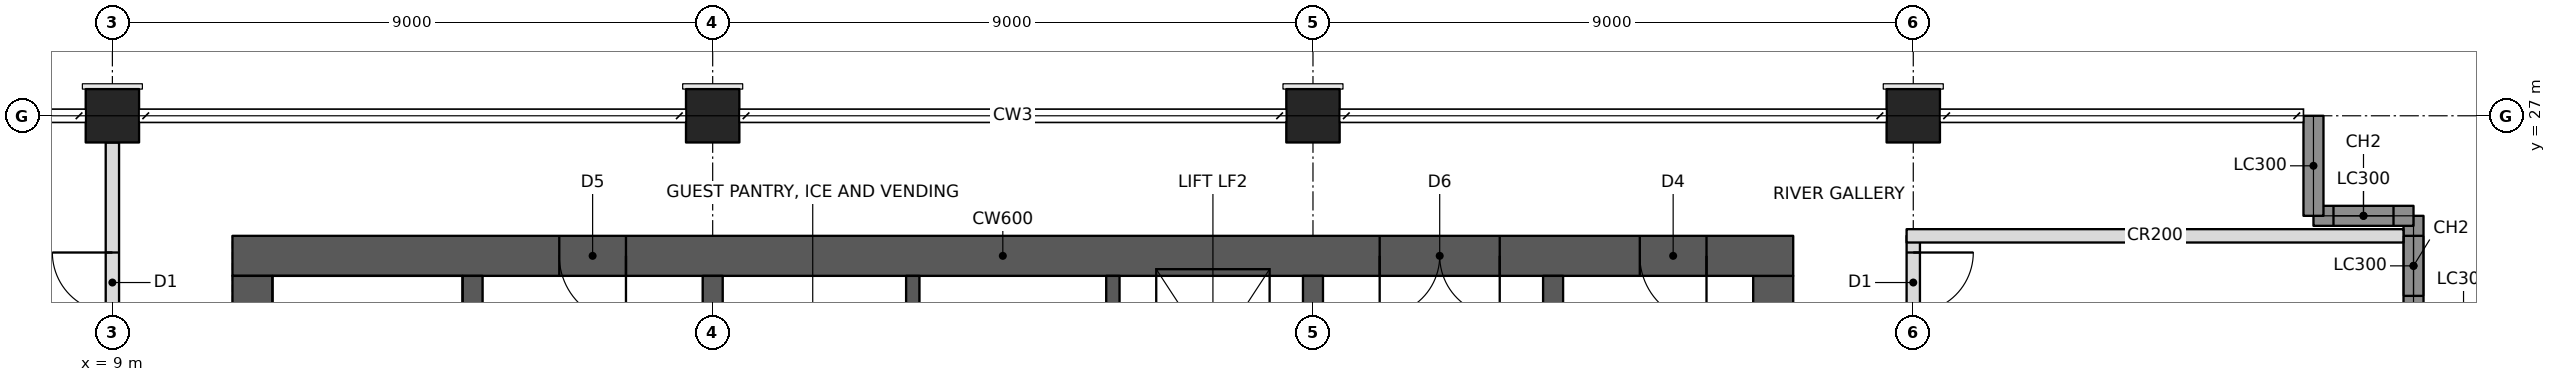
"""IFC4 building model, lengths in metres.
Left out: names, types, materials, properties, quantities, classifications, styles, units other than length and angle.
Written with IfcOpenShell. Run it as: python <this file> out.ifc"""

import sys

from ifc_helpers import new_model, si_unit, direction, frame, frame_2d, origin, origin_2d, place, context, subcontext, project, spatial, rectangle, hollow_rectangle, extrude, element, fill, save


model = new_model("IFC4")
c1 = context("Model", 3, precision=1e-05, world=origin(), true_north=direction((0.0, 1.0)))
c2 = subcontext(c1, "Body", "Model", "MODEL_VIEW")
j1 = project(units=[si_unit("LENGTHUNIT", "METRE"), si_unit("PLANEANGLEUNIT", "RADIAN")], contexts=[c1])
p1 = place(None, origin())
s1 = spatial("IfcSite", under=j1, at=p1, CompositionType="ELEMENT")
p2 = place(p1, origin())
s2 = spatial("IfcBuilding", under=s1, at=p2, CompositionType="ELEMENT")
p3 = place(p2, frame((0.0, 0.0, 187.6)))
s3 = spatial("IfcBuildingStorey", under=s2, at=p3, CompositionType="ELEMENT", Elevation=187.6)
for number, where, z_axis, x_axis in (
    (1, (9.0, 27.0, 0.0), (0.0, 0.0, 1.0), (1.0, 0.0, 0.0)),
    (2, (18.0, 27.0, 0.0), (0.0, 0.0, 1.0), (1.0, 0.0, 0.0)),
    (3, (27.0, 27.0, 0.0), (0.0, 0.0, 1.0), (1.0, 0.0, 0.0)),
    (4, (36.0, 27.0, 0.0), (0.0, 0.0, 1.0), (1.0, 0.0, 0.0)),
):
    element("IfcColumn", number, at=place(p3, frame(where, z_axis=z_axis, x_axis=x_axis)), inside=s3, PredefinedType="COLUMN", context=c2, shape_type="SweptSolid", body=[
        extrude(hollow_rectangle(XDim=0.8, YDim=0.8, WallThickness=0.07, at=origin_2d()), origin(), (0.0, 0.0, 1.0), 3.4),
    ])
p4 = place(p3, frame((10.8, 24.9, 0.0), z_axis=(0.0, 0.0, 1.0), x_axis=(1.0, 0.0, 0.0)))
e5 = element("IfcWall", 5, at=p4, inside=s3, PredefinedType="SHEAR", context=c2, shape_type="SweptSolid", body=[
    extrude(rectangle(XDim=23.4, YDim=0.6, at=frame_2d((11.7, 0.0))), origin(), (0.0, 0.0, 1.0), 3.4),
])
p5 = place(p4, frame((17.2, 0.0, 0.0)))
e6 = element("IfcOpeningElement", 6, at=p5, cuts=e5, PredefinedType="OPENING", context=c2, shape_type="SweptSolid", body=[
    extrude(rectangle(XDim=1.8, YDim=2.1, at=frame_2d((0.9, 1.05))), frame((0.0, 0.31, 0.0), z_axis=(0.0, -1.0, 0.0), x_axis=(1.0, 0.0, 0.0)), (0.0, 0.0, 1.0), 0.62),
])
p6 = place(p4, frame((21.1, 0.0, 0.0)))
e7 = element("IfcOpeningElement", 7, at=p6, cuts=e5, PredefinedType="OPENING", context=c2, shape_type="SweptSolid", body=[
    extrude(rectangle(XDim=1.0, YDim=2.1, at=frame_2d((0.5, 1.05))), frame((0.0, 0.31, 0.0), z_axis=(0.0, -1.0, 0.0), x_axis=(1.0, 0.0, 0.0)), (0.0, 0.0, 1.0), 0.62),
])
p7 = place(p4, frame((4.9, 0.0, 0.0)))
e8 = element("IfcOpeningElement", 8, at=p7, cuts=e5, PredefinedType="OPENING", context=c2, shape_type="SweptSolid", body=[
    extrude(rectangle(XDim=1.0, YDim=2.1, at=frame_2d((0.5, 1.05))), frame((0.0, 0.31, 0.0), z_axis=(0.0, -1.0, 0.0), x_axis=(1.0, 0.0, 0.0)), (0.0, 0.0, 1.0), 0.62),
])
for number, where, z_axis, x_axis in (
    (9, (11.1, 11.4, 0.0), (0.0, 0.0, 1.0), (0.0, 1.0, 0.0)),
    (10, (33.9, 11.4, 0.0), (0.0, 0.0, 1.0), (0.0, 1.0, 0.0)),
):
    element("IfcWall", number, at=place(p3, frame(where, z_axis=z_axis, x_axis=x_axis)), inside=s3, PredefinedType="SHEAR", context=c2, shape_type="SweptSolid", body=[
        extrude(rectangle(XDim=13.2, YDim=0.6, at=frame_2d((6.6, 0.0))), origin(), (0.0, 0.0, 1.0), 3.4),
    ])
p8 = place(p3, frame((14.4, 11.4, 0.0), z_axis=(0.0, 0.0, 1.0), x_axis=(0.0, 1.0, 0.0)))
e11 = element("IfcWall", 11, at=p8, inside=s3, PredefinedType="SHEAR", context=c2, shape_type="SweptSolid", body=[
    extrude(rectangle(XDim=13.2, YDim=0.3, at=frame_2d((6.6, 0.0))), origin(), (0.0, 0.0, 1.0), 3.4),
])
p9 = place(p3, frame((18.0, 11.4, 0.0), z_axis=(0.0, 0.0, 1.0), x_axis=(0.0, 1.0, 0.0)))
e12 = element("IfcWall", 12, at=p9, inside=s3, PredefinedType="SHEAR", context=c2, shape_type="SweptSolid", body=[
    extrude(rectangle(XDim=13.2, YDim=0.3, at=frame_2d((6.6, 0.0))), origin(), (0.0, 0.0, 1.0), 3.4),
])
p10 = place(p9, frame((3.6, 0.0, 0.0)))
e13 = element("IfcOpeningElement", 13, at=p10, cuts=e12, PredefinedType="OPENING", context=c2, shape_type="SweptSolid", body=[
    extrude(rectangle(XDim=1.0, YDim=2.1, at=frame_2d((0.5, 1.05))), frame((0.0, 0.16, 0.0), z_axis=(0.0, -1.0, 0.0), x_axis=(1.0, 0.0, 0.0)), (0.0, 0.0, 1.0), 0.32),
])
p11 = place(p9, frame((7.85, 0.0, 0.0)))
e14 = element("IfcOpeningElement", 14, at=p11, cuts=e12, PredefinedType="OPENING", context=c2, shape_type="SweptSolid", body=[
    extrude(rectangle(XDim=1.1, YDim=2.1, at=frame_2d((0.55, 1.05))), frame((0.0, 0.16, 0.0), z_axis=(0.0, -1.0, 0.0), x_axis=(1.0, 0.0, 0.0)), (0.0, 0.0, 1.0), 0.32),
])
p12 = place(p3, frame((27.0, 21.75, 0.0), z_axis=(0.0, 0.0, 1.0), x_axis=(0.0, 1.0, 0.0)))
e15 = element("IfcWall", 15, at=p12, inside=s3, PredefinedType="SHEAR", context=c2, shape_type="SweptSolid", body=[
    extrude(rectangle(XDim=2.85, YDim=0.3, at=frame_2d((1.425, 0.0))), origin(), (0.0, 0.0, 1.0), 3.4),
])
for number, where, z_axis, x_axis in (
    (16, (21.0, 21.75, 0.0), (0.0, 0.0, 1.0), (0.0, 1.0, 0.0)),
    (17, (24.0, 21.75, 0.0), (0.0, 0.0, 1.0), (0.0, 1.0, 0.0)),
):
    element("IfcWall", number, at=place(p3, frame(where, z_axis=z_axis, x_axis=x_axis)), inside=s3, PredefinedType="SHEAR", context=c2, shape_type="SweptSolid", body=[
        extrude(rectangle(XDim=2.85, YDim=0.2, at=frame_2d((1.425, 0.0))), origin(), (0.0, 0.0, 1.0), 3.4),
    ])
p13 = place(p3, frame((30.6, 11.4, 0.0), z_axis=(0.0, 0.0, 1.0), x_axis=(0.0, 1.0, 0.0)))
e18 = element("IfcWall", 18, at=p13, inside=s3, PredefinedType="SHEAR", context=c2, shape_type="SweptSolid", body=[
    extrude(rectangle(XDim=13.2, YDim=0.3, at=frame_2d((6.6, 0.0))), origin(), (0.0, 0.0, 1.0), 3.4),
])
p14 = place(p3, frame((43.5, 24.0, 0.0), z_axis=(0.0, 0.0, 1.0), x_axis=(0.0, 1.0, 0.0)))
e19 = element("IfcWall", 19, at=p14, inside=s3, PredefinedType="SOLIDWALL", context=c2, shape_type="SweptSolid", body=[
    extrude(rectangle(XDim=1.5, YDim=0.3, at=frame_2d((0.75, 0.0))), origin(), (0.0, 0.0, 1.0), 3.2),
])
p15 = place(p14, frame((0.3, 0.0, 0.6)))
e20 = element("IfcOpeningElement", 20, at=p15, cuts=e19, PredefinedType="OPENING", context=c2, shape_type="SweptSolid", body=[
    extrude(rectangle(XDim=0.9, YDim=2.2, at=frame_2d((0.45, 1.1))), frame((0.0, 0.16, 0.0), z_axis=(0.0, -1.0, 0.0), x_axis=(1.0, 0.0, 0.0)), (0.0, 0.0, 1.0), 0.32),
])
p16 = place(p3, frame((43.5, 25.5, 0.0), z_axis=(0.0, 0.0, 1.0), x_axis=(-1.0, 0.0, 0.0)))
e21 = element("IfcWall", 21, at=p16, inside=s3, PredefinedType="SOLIDWALL", context=c2, shape_type="SweptSolid", body=[
    extrude(rectangle(XDim=1.5, YDim=0.3, at=frame_2d((0.75, 0.0))), origin(), (0.0, 0.0, 1.0), 3.2),
])
p17 = place(p16, frame((0.3, 0.0, 0.6)))
e22 = element("IfcOpeningElement", 22, at=p17, cuts=e21, PredefinedType="OPENING", context=c2, shape_type="SweptSolid", body=[
    extrude(rectangle(XDim=0.9, YDim=2.2, at=frame_2d((0.45, 1.1))), frame((0.0, 0.16, 0.0), z_axis=(0.0, -1.0, 0.0), x_axis=(1.0, 0.0, 0.0)), (0.0, 0.0, 1.0), 0.32),
])
p18 = place(p3, frame((42.0, 25.5, 0.0), z_axis=(0.0, 0.0, 1.0), x_axis=(0.0, 1.0, 0.0)))
e23 = element("IfcWall", 23, at=p18, inside=s3, PredefinedType="SOLIDWALL", context=c2, shape_type="SweptSolid", body=[
    extrude(rectangle(XDim=1.5, YDim=0.3, at=frame_2d((0.75, 0.0))), origin(), (0.0, 0.0, 1.0), 2.42),
])
p19 = place(p3, frame((9.0, 18.4, 0.0), z_axis=(0.0, 0.0, 1.0), x_axis=(0.0, 1.0, 0.0)))
e24 = element("IfcWall", 24, at=p19, inside=s3, PredefinedType="PARTITIONING", context=c2, shape_type="SweptSolid", body=[
    extrude(rectangle(XDim=8.2, YDim=0.2, at=frame_2d((4.1, 0.0))), origin(), (0.0, 0.0, 1.0), 2.405),
])
p20 = place(p19, frame((5.65, 0.0, 0.0)))
e25 = element("IfcOpeningElement", 25, at=p20, cuts=e24, PredefinedType="OPENING", context=c2, shape_type="SweptSolid", body=[
    extrude(rectangle(XDim=0.9, YDim=2.1, at=frame_2d((0.45, 1.05))), frame((0.0, 0.11, 0.0), z_axis=(0.0, -1.0, 0.0), x_axis=(1.0, 0.0, 0.0)), (0.0, 0.0, 1.0), 0.22),
])
p21 = place(p3, frame((36.0, 18.4, 0.0), z_axis=(0.0, 0.0, 1.0), x_axis=(0.0, 1.0, 0.0)))
e26 = element("IfcWall", 26, at=p21, inside=s3, PredefinedType="PARTITIONING", context=c2, shape_type="SweptSolid", body=[
    extrude(rectangle(XDim=6.8, YDim=0.2, at=frame_2d((3.4, 0.0))), origin(), (0.0, 0.0, 1.0), 2.405),
])
p22 = place(p21, frame((5.65, 0.0, 0.0)))
e27 = element("IfcOpeningElement", 27, at=p22, cuts=e26, PredefinedType="OPENING", context=c2, shape_type="SweptSolid", body=[
    extrude(rectangle(XDim=0.9, YDim=2.1, at=frame_2d((0.45, 1.05))), frame((0.0, 0.11, 0.0), z_axis=(0.0, -1.0, 0.0), x_axis=(1.0, 0.0, 0.0)), (0.0, 0.0, 1.0), 0.22),
])
p23 = place(p3, frame((35.9, 25.2, 0.0), z_axis=(0.0, 0.0, 1.0), x_axis=(1.0, 0.0, 0.0)))
e28 = element("IfcWall", 28, at=p23, inside=s3, PredefinedType="PARTITIONING", context=c2, shape_type="SweptSolid", body=[
    extrude(rectangle(XDim=7.45, YDim=0.2, at=frame_2d((3.725, 0.0))), origin(), (0.0, 0.0, 1.0), 2.404),
])
p24 = place(p15, origin())
e29 = element("IfcWindow", 29, at=p24, inside=s3, PartitioningType="SINGLE_PANEL", PredefinedType="WINDOW", context=c2, shape_type="SweptSolid", body=[
    extrude(rectangle(XDim=0.9, YDim=2.2, at=frame_2d((0.45, 1.1))), frame((0.0, 0.03, 0.0), z_axis=(0.0, -1.0, 0.0), x_axis=(1.0, 0.0, 0.0)), (0.0, 0.0, 1.0), 0.06),
])
fill(e20, e29)
p25 = place(p17, origin())
e30 = element("IfcWindow", 30, at=p25, inside=s3, PartitioningType="SINGLE_PANEL", PredefinedType="WINDOW", context=c2, shape_type="SweptSolid", body=[
    extrude(rectangle(XDim=0.9, YDim=2.2, at=frame_2d((0.45, 1.1))), frame((0.0, 0.03, 0.0), z_axis=(0.0, -1.0, 0.0), x_axis=(1.0, 0.0, 0.0)), (0.0, 0.0, 1.0), 0.06),
])
fill(e22, e30)
p26 = place(p20, origin())
e31 = element("IfcDoor", 31, at=p26, inside=s3, OperationType="SINGLE_SWING_RIGHT", PredefinedType="DOOR", context=c2, shape_type="SweptSolid", body=[
    extrude(rectangle(XDim=0.9, YDim=2.1, at=frame_2d((0.45, 1.05))), frame((0.0, 0.025, 0.0), z_axis=(0.0, -1.0, 0.0), x_axis=(1.0, 0.0, 0.0)), (0.0, 0.0, 1.0), 0.05),
])
fill(e25, e31)
p27 = place(p22, frame((0.9, 0.0, 0.0), z_axis=(0.0, 0.0, 1.0), x_axis=(-1.0, 0.0, 0.0)))
e32 = element("IfcDoor", 32, at=p27, inside=s3, OperationType="SINGLE_SWING_LEFT", PredefinedType="DOOR", context=c2, shape_type="SweptSolid", body=[
    extrude(rectangle(XDim=0.9, YDim=2.1, at=frame_2d((0.45, 1.05))), frame((0.0, 0.025, 0.0), z_axis=(0.0, -1.0, 0.0), x_axis=(1.0, 0.0, 0.0)), (0.0, 0.0, 1.0), 0.05),
])
fill(e27, e32)
p28 = place(p5, frame((1.8, 0.0, 0.0), z_axis=(0.0, 0.0, 1.0), x_axis=(-1.0, 0.0, 0.0)))
e33 = element("IfcDoor", 33, at=p28, inside=s3, OperationType="DOUBLE_DOOR_SINGLE_SWING", PredefinedType="DOOR", context=c2, shape_type="SweptSolid", body=[
    extrude(rectangle(XDim=1.8, YDim=2.1, at=frame_2d((0.9, 1.05))), frame((0.0, 0.025, 0.0), z_axis=(0.0, -1.0, 0.0), x_axis=(1.0, 0.0, 0.0)), (0.0, 0.0, 1.0), 0.05),
])
fill(e6, e33)
p29 = place(p6, frame((1.0, 0.0, 0.0), z_axis=(0.0, 0.0, 1.0), x_axis=(-1.0, 0.0, 0.0)))
e34 = element("IfcDoor", 34, at=p29, inside=s3, OperationType="SINGLE_SWING_LEFT", PredefinedType="DOOR", context=c2, shape_type="SweptSolid", body=[
    extrude(rectangle(XDim=1.0, YDim=2.1, at=frame_2d((0.5, 1.05))), frame((0.0, 0.025, 0.0), z_axis=(0.0, -1.0, 0.0), x_axis=(1.0, 0.0, 0.0)), (0.0, 0.0, 1.0), 0.05),
])
fill(e7, e34)
p30 = place(p7, frame((1.0, 0.0, 0.0), z_axis=(0.0, 0.0, 1.0), x_axis=(-1.0, 0.0, 0.0)))
e35 = element("IfcDoor", 35, at=p30, inside=s3, OperationType="SINGLE_SWING_LEFT", PredefinedType="DOOR", context=c2, shape_type="SweptSolid", body=[
    extrude(rectangle(XDim=1.0, YDim=2.1, at=frame_2d((0.5, 1.05))), frame((0.0, 0.025, 0.0), z_axis=(0.0, -1.0, 0.0), x_axis=(1.0, 0.0, 0.0)), (0.0, 0.0, 1.0), 0.05),
])
fill(e8, e35)
save(model, sys.argv[1])
